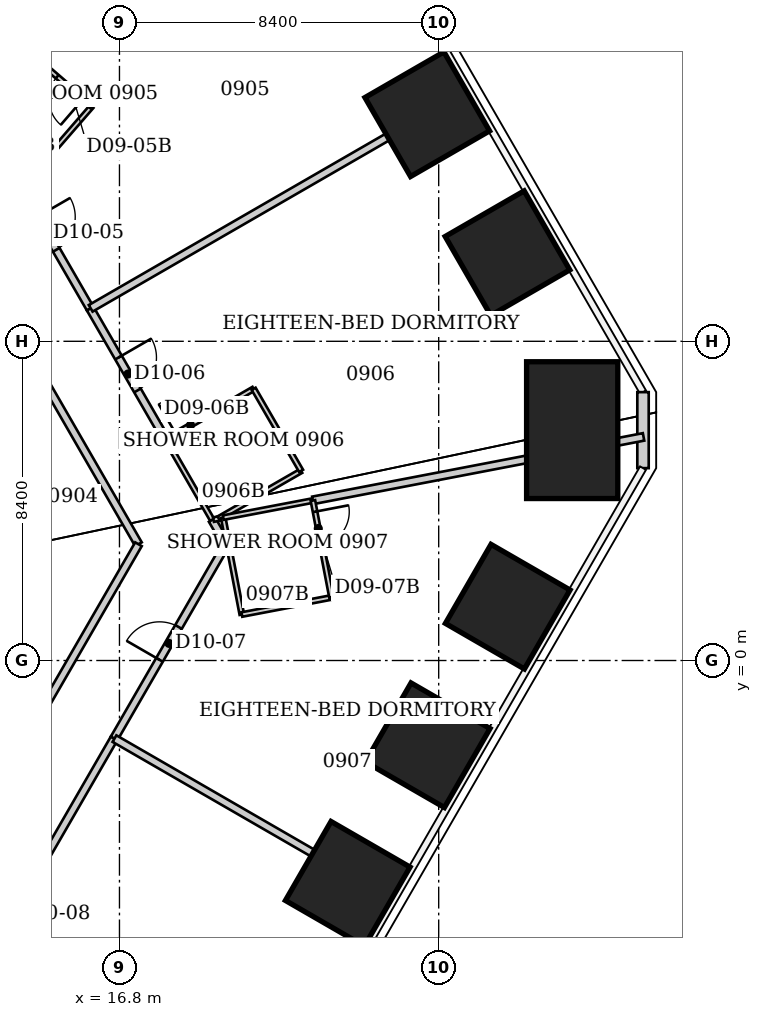
"""IFC4 building model, lengths in metres.
Left out: names, types, materials, properties, quantities, classifications, styles, units other than length and angle.
Written with IfcOpenShell. Run it as: python <this file> out.ifc"""

import sys

from ifc_helpers import new_model, si_unit, direction, frame, frame_2d, origin, origin_2d, place, context, subcontext, project, spatial, rectangle, extrude, element, fill, save


model = new_model("IFC4")
c1 = context("Model", 3, precision=1e-05, world=origin(), true_north=direction((0.0, 1.0)))
c2 = subcontext(c1, "Body", "Model", "MODEL_VIEW")
j1 = project(units=[si_unit("LENGTHUNIT", "METRE"), si_unit("PLANEANGLEUNIT", "RADIAN")], contexts=[c1])
p1 = place(None, origin())
s1 = spatial("IfcSite", under=j1, at=p1, CompositionType="ELEMENT")
p2 = place(p1, origin())
s2 = spatial("IfcBuilding", under=s1, at=p2, CompositionType="ELEMENT")
p3 = place(p2, frame((0.0, 0.0, 42.0)))
s3 = spatial("IfcBuildingStorey", under=s2, at=p3, CompositionType="ELEMENT", Elevation=42.0)
for number, where, z_axis, x_axis in (
    (1, (24.899, 14.375, 0.0), (0.0, 0.0, 1.0), (0.866, 0.5, 0.0)),
    (2, (27.01, 10.719, 0.0), (0.0, 0.0, 1.0), (0.866, 0.5, 0.0)),
):
    element("IfcColumn", number, at=place(p3, frame(where, z_axis=z_axis, x_axis=x_axis)), inside=s3, PredefinedType="COLUMN", context=c2, shape_type="SweptSolid", body=[
        extrude(rectangle(XDim=2.4, YDim=2.4, at=origin_2d()), origin(), (0.0, 0.0, 1.0), 3.8),
    ])
p4 = place(p3, frame((28.713, 6.062, 0.0), z_axis=(0.0, 0.0, 1.0), x_axis=(1.0, 0.0, 0.0)))
e3 = element("IfcColumn", 3, at=p4, inside=s3, PredefinedType="COLUMN", context=c2, shape_type="SweptSolid", body=[
    extrude(rectangle(XDim=2.4, YDim=3.6, at=origin_2d()), origin(), (0.0, 0.0, 1.0), 3.8),
])
for number, where, z_axis, x_axis in (
    (4, (27.016, 1.416, 0.0), (0.0, 0.0, 1.0), (0.866, -0.5, 0.0)),
    (5, (24.911, -2.23, 0.0), (0.0, 0.0, 1.0), (0.866, -0.5, 0.0)),
    (6, (22.806, -5.875, 0.0), (0.0, 0.0, 1.0), (0.866, -0.5, 0.0)),
):
    element("IfcColumn", number, at=place(p3, frame(where, z_axis=z_axis, x_axis=x_axis)), inside=s3, PredefinedType="COLUMN", context=c2, shape_type="SweptSolid", body=[
        extrude(rectangle(XDim=2.4, YDim=2.4, at=origin_2d()), origin(), (0.0, 0.0, 1.0), 3.8),
    ])
p5 = place(p3, frame((30.576, 7.062, 0.0), z_axis=(0.0, 0.0, 1.0), x_axis=(0.0, -1.0, 0.0)))
e7 = element("IfcWall", 7, at=p5, inside=s3, PredefinedType="SOLIDWALL", context=c2, shape_type="SweptSolid", body=[
    extrude(rectangle(XDim=2.0, YDim=0.3, at=frame_2d((1.0, 0.0))), origin(), (0.0, 0.0, 1.0), 3.64),
])
p6 = place(p3, frame((11.33, -11.28, 0.0), z_axis=(0.0, 0.0, 1.0), x_axis=(0.50006348966, 0.865988744909, 0.0)))
e8 = element("IfcWall", 8, at=p6, inside=s3, PredefinedType="PARTITIONING", context=c2, shape_type="SweptSolid", body=[
    extrude(rectangle(XDim=10.658, YDim=0.2, at=frame_2d((5.329, 0.0))), origin(), (0.0, 0.0, 1.0), 3.64),
])
p7 = place(p6, frame((4.829, 0.0, 0.0)))
e9 = element("IfcOpeningElement", 9, at=p7, cuts=e8, PredefinedType="OPENING", context=c2, shape_type="SweptSolid", body=[
    extrude(rectangle(XDim=1.0, YDim=2.13, at=frame_2d((0.5, 1.065))), frame((0.0, 0.1, 0.0), z_axis=(0.0, -1.0, 0.0), x_axis=(1.0, 0.0, 0.0)), (0.0, 0.0, 1.0), 0.2),
])
p8 = place(p3, frame((12.46, 11.45, 0.0), z_axis=(0.0, 0.0, 1.0), x_axis=(0.499704269421, -0.866196076603, 0.0)))
e10 = element("IfcWall", 10, at=p8, inside=s3, PredefinedType="PARTITIONING", context=c2, shape_type="SweptSolid", body=[
    extrude(rectangle(XDim=9.686, YDim=0.2, at=frame_2d((4.843, 0.0))), origin(), (0.0, 0.0, 1.0), 3.64),
])
p9 = place(p3, frame((13.742, 13.22, 0.0), z_axis=(0.0, 0.0, 1.0), x_axis=(0.500169095125, -0.865927754655, 0.0)))
e11 = element("IfcWall", 11, at=p9, inside=s3, PredefinedType="PARTITIONING", context=c2, shape_type="SweptSolid", body=[
    extrude(rectangle(XDim=4.574, YDim=0.2, at=frame_2d((2.287, 0.0))), origin(), (0.0, 0.0, 1.0), 3.64),
])
p10 = place(p9, frame((1.787, 0.0, 0.0)))
e12 = element("IfcOpeningElement", 12, at=p10, cuts=e11, PredefinedType="OPENING", context=c2, shape_type="SweptSolid", body=[
    extrude(rectangle(XDim=1.0, YDim=2.13, at=frame_2d((0.5, 1.065))), frame((0.0, 0.1, 0.0), z_axis=(0.0, -1.0, 0.0), x_axis=(1.0, 0.0, 0.0)), (0.0, 0.0, 1.0), 0.2),
])
p11 = place(p3, frame((14.5, 12.77, 0.0), z_axis=(0.0, 0.0, 1.0), x_axis=(0.655252439976, 0.755409981338, 0.0)))
e13 = element("IfcWall", 13, at=p11, inside=s3, PredefinedType="PARTITIONING", context=c2, shape_type="SweptSolid", body=[
    extrude(rectangle(XDim=2.396, YDim=0.12, at=frame_2d((1.198, 0.0))), origin(), (0.0, 0.0, 1.0), 3.64),
])
p12 = place(p3, frame((16.03, 9.26, 0.0), z_axis=(0.0, 0.0, 1.0), x_axis=(0.500123041693, -0.865954353975, 0.0)))
e14 = element("IfcWall", 14, at=p12, inside=s3, PredefinedType="PARTITIONING", context=c2, shape_type="SweptSolid", body=[
    extrude(rectangle(XDim=3.974, YDim=0.2, at=frame_2d((1.987, 0.0))), origin(), (0.0, 0.0, 1.0), 3.64),
])
p13 = place(p12, frame((1.487, 0.0, 0.0)))
e15 = element("IfcOpeningElement", 15, at=p13, cuts=e14, PredefinedType="OPENING", context=c2, shape_type="SweptSolid", body=[
    extrude(rectangle(XDim=1.0, YDim=2.13, at=frame_2d((0.5, 1.065))), frame((0.0, 0.1, 0.0), z_axis=(0.0, -1.0, 0.0), x_axis=(1.0, 0.0, 0.0)), (0.0, 0.0, 1.0), 0.2),
])
p14 = place(p3, frame((16.07, 14.58, 0.0), z_axis=(0.0, 0.0, 1.0), x_axis=(-0.757086659925, 0.653314464377, 0.0)))
e16 = element("IfcWall", 16, at=p14, inside=s3, PredefinedType="PARTITIONING", context=c2, shape_type="SweptSolid", body=[
    extrude(rectangle(XDim=2.602, YDim=0.12, at=frame_2d((1.301, 0.0))), origin(), (0.0, 0.0, 1.0), 3.64),
])
p15 = place(p14, frame((0.3, 0.0, 0.0)))
e17 = element("IfcOpeningElement", 17, at=p15, cuts=e16, PredefinedType="OPENING", context=c2, shape_type="SweptSolid", body=[
    extrude(rectangle(XDim=0.9, YDim=2.03, at=frame_2d((0.45, 1.015))), frame((0.0, 0.06, 0.0), z_axis=(0.0, -1.0, 0.0), x_axis=(1.0, 0.0, 0.0)), (0.0, 0.0, 1.0), 0.12),
])
p16 = place(p3, frame((16.66, -2.05, 0.0), z_axis=(0.0, 0.0, 1.0), x_axis=(0.499994452889, 0.866028606387, 0.0)))
e18 = element("IfcWall", 18, at=p16, inside=s3, PredefinedType="PARTITIONING", context=c2, shape_type="SweptSolid", body=[
    extrude(rectangle(XDim=5.775, YDim=0.2, at=frame_2d((2.888, 0.0))), origin(), (0.0, 0.0, 1.0), 3.64),
])
p17 = place(p16, frame((2.388, 0.0, 0.0)))
e19 = element("IfcOpeningElement", 19, at=p17, cuts=e18, PredefinedType="OPENING", context=c2, shape_type="SweptSolid", body=[
    extrude(rectangle(XDim=1.0, YDim=2.13, at=frame_2d((0.5, 1.065))), frame((0.0, 0.1, 0.0), z_axis=(0.0, -1.0, 0.0), x_axis=(1.0, 0.0, 0.0)), (0.0, 0.0, 1.0), 0.2),
])
p18 = place(p3, frame((17.3, 3.06, 0.0), z_axis=(0.0, 0.0, 1.0), x_axis=(-0.500175206663, -0.865924224537, 0.0)))
e20 = element("IfcWall", 20, at=p18, inside=s3, PredefinedType="PARTITIONING", context=c2, shape_type="SweptSolid", body=[
    extrude(rectangle(XDim=12.275, YDim=0.2, at=frame_2d((6.138, 0.0))), origin(), (0.0, 0.0, 1.0), 3.64),
])
p19 = place(p3, frame((18.018, 5.819, 0.0), z_axis=(0.0, 0.0, 1.0), x_axis=(0.499757016066, -0.866165645181, 0.0)))
e21 = element("IfcWall", 21, at=p19, inside=s3, PredefinedType="PARTITIONING", context=c2, shape_type="SweptSolid", body=[
    extrude(rectangle(XDim=2.446, YDim=0.12, at=frame_2d((1.223, 0.0))), origin(), (0.0, 0.0, 1.0), 3.64),
])
p20 = place(p3, frame((19.24, 3.7, 0.0), z_axis=(0.0, 0.0, 1.0), x_axis=(0.500371262739, -0.865810949009, 0.0)))
e22 = element("IfcWall", 22, at=p20, inside=s3, PredefinedType="PARTITIONING", context=c2, shape_type="SweptSolid", body=[
    extrude(rectangle(XDim=0.434, YDim=0.2, at=frame_2d((0.217, 0.0))), origin(), (0.0, 0.0, 1.0), 3.64),
])
p21 = place(p3, frame((19.274, 3.707, 0.0), z_axis=(0.0, 0.0, 1.0), x_axis=(0.979121116236, 0.203277740395, 0.0)))
e23 = element("IfcWall", 23, at=p21, inside=s3, PredefinedType="PARTITIONING", context=c2, shape_type="SweptSolid", body=[
    extrude(rectangle(XDim=0.216, YDim=0.12, at=frame_2d((0.108, 0.0))), origin(), (0.0, 0.0, 1.0), 3.64),
])
p22 = place(p3, frame((19.41, 3.74, 0.0), z_axis=(0.0, 0.0, 1.0), x_axis=(0.86653430447, 0.499117520406, 0.0)))
e24 = element("IfcWall", 24, at=p22, inside=s3, PredefinedType="PARTITIONING", context=c2, shape_type="SweptSolid", body=[
    extrude(rectangle(XDim=2.504, YDim=0.12, at=frame_2d((1.252, 0.0))), origin(), (0.0, 0.0, 1.0), 3.64),
])
p23 = place(p3, frame((19.53, 3.76, 0.0), z_axis=(0.0, 0.0, 1.0), x_axis=(0.188697442844, -0.982035271802, 0.0)))
e25 = element("IfcWall", 25, at=p23, inside=s3, PredefinedType="PARTITIONING", context=c2, shape_type="SweptSolid", body=[
    extrude(rectangle(XDim=2.597, YDim=0.12, at=frame_2d((1.298, 0.0))), origin(), (0.0, 0.0, 1.0), 3.64),
])
for number, where, z_axis, x_axis in (
    (26, (19.53, 3.76, 0.0), (0.0, 0.0, 1.0), (0.982, 0.187, 0.0)),
    (27, (20.02, 1.21, 0.0), (0.0, 0.0, 1.0), (0.982, 0.187, 0.0)),
):
    element("IfcWall", number, at=place(p3, frame(where, z_axis=z_axis, x_axis=x_axis)), inside=s3, PredefinedType="PARTITIONING", context=c2, shape_type="SweptSolid", body=[
        extrude(rectangle(XDim=2.402, YDim=0.12, at=frame_2d((1.201, 0.0))), origin(), (0.0, 0.0, 1.0), 3.64),
    ])
p24 = place(p3, frame((20.33, 7.15, 0.0), z_axis=(0.0, 0.0, 1.0), x_axis=(-0.866654860089, -0.498908161372, 0.0)))
e28 = element("IfcWall", 28, at=p24, inside=s3, PredefinedType="PARTITIONING", context=c2, shape_type="SweptSolid", body=[
    extrude(rectangle(XDim=2.666, YDim=0.12, at=frame_2d((1.333, 0.0))), origin(), (0.0, 0.0, 1.0), 3.64),
])
p25 = place(p24, frame((1.466, 0.0, 0.0)))
e29 = element("IfcOpeningElement", 29, at=p25, cuts=e28, PredefinedType="OPENING", context=c2, shape_type="SweptSolid", body=[
    extrude(rectangle(XDim=0.9, YDim=2.03, at=frame_2d((0.45, 1.015))), frame((0.0, 0.06, 0.0), z_axis=(0.0, -1.0, 0.0), x_axis=(1.0, 0.0, 0.0)), (0.0, 0.0, 1.0), 0.12),
])
p26 = place(p3, frame((21.58, 4.99, 0.0), z_axis=(0.0, 0.0, 1.0), x_axis=(-0.500893576935, 0.865508881864, 0.0)))
e30 = element("IfcWall", 30, at=p26, inside=s3, PredefinedType="PARTITIONING", context=c2, shape_type="SweptSolid", body=[
    extrude(rectangle(XDim=2.496, YDim=0.12, at=frame_2d((1.248, 0.0))), origin(), (0.0, 0.0, 1.0), 3.64),
])
p27 = place(p3, frame((21.889, 4.215, 0.0), z_axis=(0.0, 0.0, 1.0), x_axis=(0.982083212717, 0.188447773401, 0.0)))
e31 = element("IfcWall", 31, at=p27, inside=s3, PredefinedType="PARTITIONING", context=c2, shape_type="SweptSolid", body=[
    extrude(rectangle(XDim=8.86, YDim=0.2, at=frame_2d((4.43, 0.0))), origin(), (0.0, 0.0, 1.0), 3.64),
])
p28 = place(p3, frame((22.38, 1.66, 0.0), z_axis=(0.0, 0.0, 1.0), x_axis=(-0.188697442844, 0.982035271802, 0.0)))
e32 = element("IfcWall", 32, at=p28, inside=s3, PredefinedType="PARTITIONING", context=c2, shape_type="SweptSolid", body=[
    extrude(rectangle(XDim=2.597, YDim=0.12, at=frame_2d((1.298, 0.0))), origin(), (0.0, 0.0, 1.0), 3.64),
])
p29 = place(p28, frame((1.397, 0.0, 0.0)))
e33 = element("IfcOpeningElement", 33, at=p29, cuts=e32, PredefinedType="OPENING", context=c2, shape_type="SweptSolid", body=[
    extrude(rectangle(XDim=0.9, YDim=2.03, at=frame_2d((0.45, 1.015))), frame((0.0, 0.06, 0.0), z_axis=(0.0, -1.0, 0.0), x_axis=(1.0, 0.0, 0.0)), (0.0, 0.0, 1.0), 0.12),
])
p30 = place(p3, frame((23.916, -6.24, 0.0), z_axis=(0.0, 0.0, 1.0), x_axis=(-0.865982991691, 0.500073452706, 0.0)))
e34 = element("IfcWall", 34, at=p30, inside=s3, PredefinedType="PARTITIONING", context=c2, shape_type="SweptSolid", body=[
    extrude(rectangle(XDim=8.369, YDim=0.2, at=frame_2d((4.185, 0.0))), origin(), (0.0, 0.0, 1.0), 3.64),
])
p31 = place(p3, frame((25.886, 14.95, 0.0), z_axis=(0.0, 0.0, 1.0), x_axis=(-0.86604429266, -0.499967282081, 0.0)))
e35 = element("IfcWall", 35, at=p31, inside=s3, PredefinedType="PARTITIONING", context=c2, shape_type="SweptSolid", body=[
    extrude(rectangle(XDim=11.365, YDim=0.2, at=frame_2d((5.683, 0.0))), origin(), (0.0, 0.0, 1.0), 2.86),
])
p32 = place(p10, origin())
e36 = element("IfcDoor", 36, at=p32, inside=s3, OperationType="SINGLE_SWING_LEFT", PredefinedType="DOOR", context=c2, shape_type="SweptSolid", body=[
    extrude(rectangle(XDim=1.0, YDim=2.13, at=frame_2d((0.5, 1.065))), frame((0.0, 0.025, 0.0), z_axis=(0.0, -1.0, 0.0), x_axis=(1.0, 0.0, 0.0)), (0.0, 0.0, 1.0), 0.05),
])
fill(e12, e36)
p33 = place(p15, origin())
e37 = element("IfcDoor", 37, at=p33, inside=s3, OperationType="SINGLE_SWING_LEFT", PredefinedType="DOOR", context=c2, shape_type="SweptSolid", body=[
    extrude(rectangle(XDim=0.9, YDim=2.03, at=frame_2d((0.45, 1.015))), frame((0.0, 0.025, 0.0), z_axis=(0.0, -1.0, 0.0), x_axis=(1.0, 0.0, 0.0)), (0.0, 0.0, 1.0), 0.05),
])
fill(e17, e37)
p34 = place(p13, origin())
e38 = element("IfcDoor", 38, at=p34, inside=s3, OperationType="SINGLE_SWING_LEFT", PredefinedType="DOOR", context=c2, shape_type="SweptSolid", body=[
    extrude(rectangle(XDim=1.0, YDim=2.13, at=frame_2d((0.5, 1.065))), frame((0.0, 0.025, 0.0), z_axis=(0.0, -1.0, 0.0), x_axis=(1.0, 0.0, 0.0)), (0.0, 0.0, 1.0), 0.05),
])
fill(e15, e38)
p35 = place(p25, origin())
e39 = element("IfcDoor", 39, at=p35, inside=s3, OperationType="SINGLE_SWING_RIGHT", PredefinedType="DOOR", context=c2, shape_type="SweptSolid", body=[
    extrude(rectangle(XDim=0.9, YDim=2.03, at=frame_2d((0.45, 1.015))), frame((0.0, 0.025, 0.0), z_axis=(0.0, -1.0, 0.0), x_axis=(1.0, 0.0, 0.0)), (0.0, 0.0, 1.0), 0.05),
])
fill(e29, e39)
p36 = place(p17, origin())
e40 = element("IfcDoor", 40, at=p36, inside=s3, OperationType="SINGLE_SWING_LEFT", PredefinedType="DOOR", context=c2, shape_type="SweptSolid", body=[
    extrude(rectangle(XDim=1.0, YDim=2.13, at=frame_2d((0.5, 1.065))), frame((0.0, 0.025, 0.0), z_axis=(0.0, -1.0, 0.0), x_axis=(1.0, 0.0, 0.0)), (0.0, 0.0, 1.0), 0.05),
])
fill(e19, e40)
p37 = place(p29, origin())
e41 = element("IfcDoor", 41, at=p37, inside=s3, OperationType="SINGLE_SWING_RIGHT", PredefinedType="DOOR", context=c2, shape_type="SweptSolid", body=[
    extrude(rectangle(XDim=0.9, YDim=2.03, at=frame_2d((0.45, 1.015))), frame((0.0, 0.025, 0.0), z_axis=(0.0, -1.0, 0.0), x_axis=(1.0, 0.0, 0.0)), (0.0, 0.0, 1.0), 0.05),
])
fill(e33, e41)
save(model, sys.argv[1])
